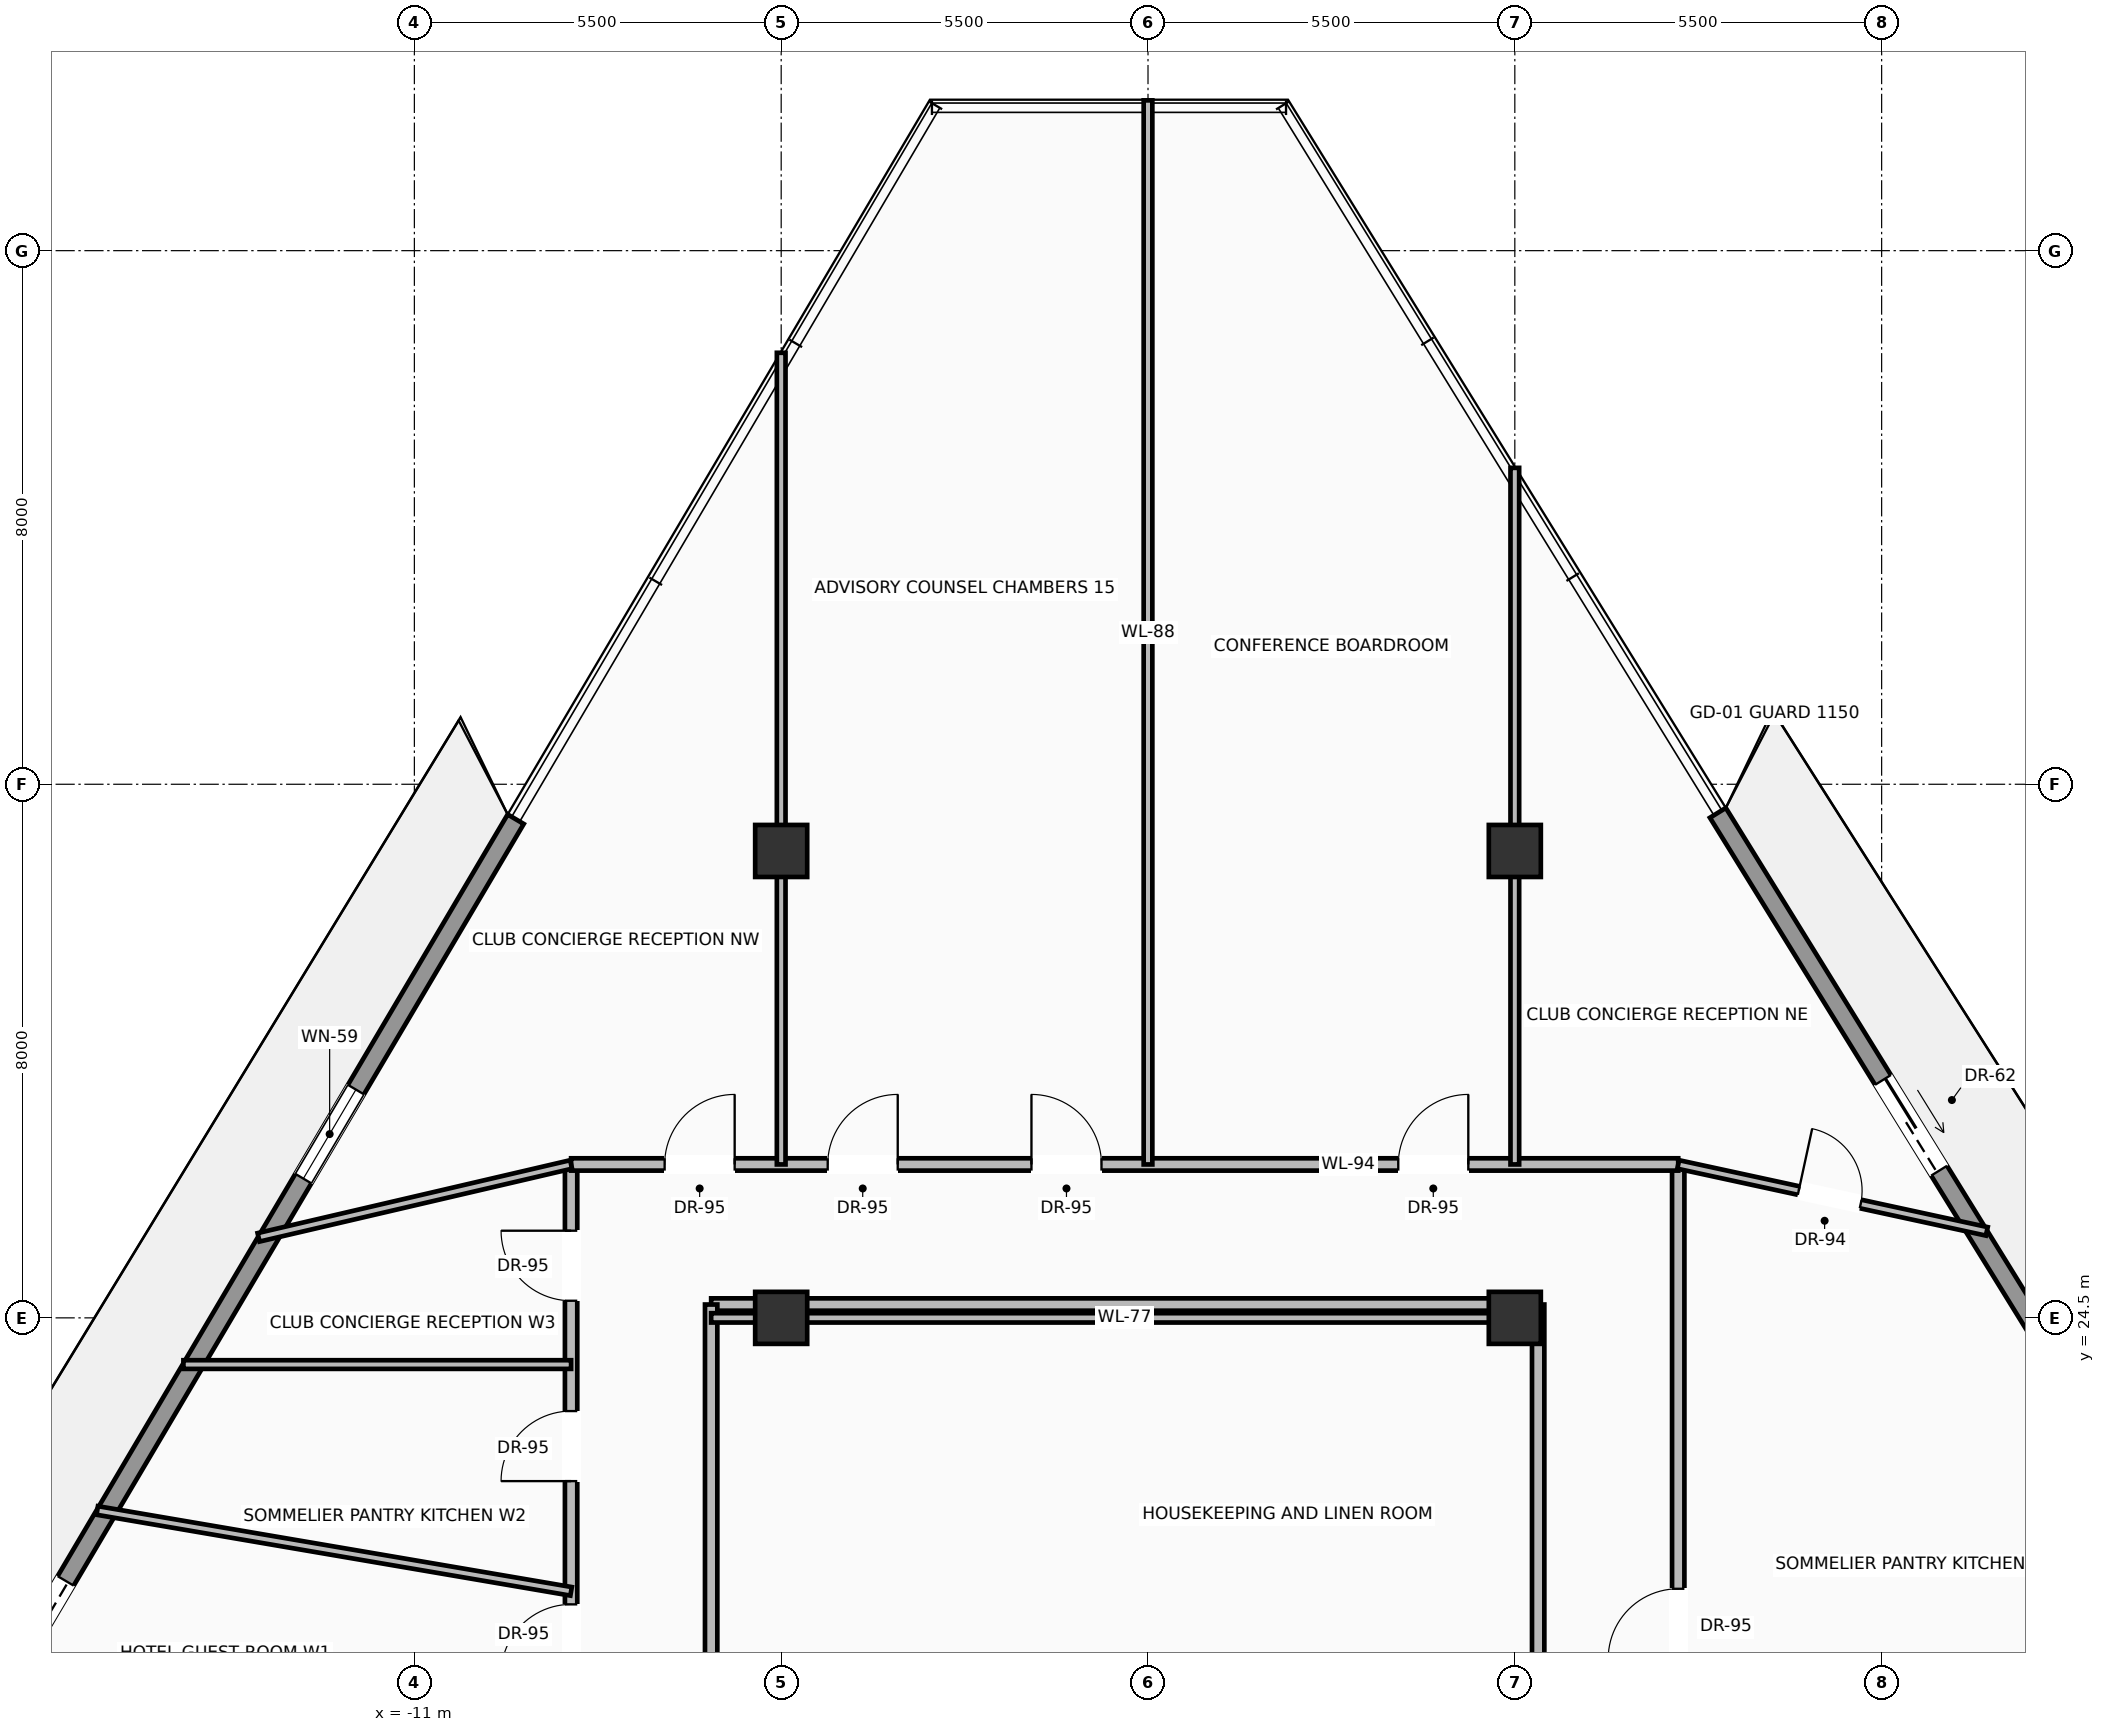
"""IFC4 building model, lengths in metres.
Left out: names, types, materials, properties, quantities, classifications, styles, units other than length and angle.
Written with IfcOpenShell. Run it as: python <this file> out.ifc"""

import sys

from ifc_helpers import new_model, si_unit, direction, frame, frame_2d, origin, origin_2d, place, context, subcontext, project, spatial, rectangle, extrude, source, transform, mapped, element, fill, save


model = new_model("IFC4")
c1 = context("Model", 3, precision=1e-05, world=origin(), true_north=direction((0.0, 1.0)))
c2 = subcontext(c1, "Body", "Model", "MODEL_VIEW")
j1 = project(units=[si_unit("LENGTHUNIT", "METRE"), si_unit("PLANEANGLEUNIT", "RADIAN")], contexts=[c1])
p1 = place(None, origin())
s1 = spatial("IfcSite", under=j1, at=p1, CompositionType="ELEMENT")
p2 = place(p1, origin())
s2 = spatial("IfcBuilding", under=s1, at=p2, CompositionType="ELEMENT")
p3 = place(p2, frame((0.0, 0.0, 237.25)))
s3 = spatial("IfcBuildingStorey", under=s2, at=p3, CompositionType="ELEMENT", Elevation=237.25)
m1 = source(origin(), c2, "Body", "SweptSolid", [
    extrude(rectangle(XDim=0.78, YDim=0.78, at=origin_2d()), origin(), (0.0, 0.0, 1.0), 3.45),
])
for number, where, z_axis, x_axis in (
    (1, (-5.5, 24.5, 0.0), (0.0, 0.0, 1.0), (1.0, 0.0, 0.0)),
    (2, (5.5, 24.5, 0.0), (0.0, 0.0, 1.0), (1.0, 0.0, 0.0)),
    (3, (-5.5, 31.5, 0.0), (0.0, 0.0, 1.0), (1.0, 0.0, 0.0)),
    (4, (5.5, 31.5, 0.0), (0.0, 0.0, 1.0), (1.0, 0.0, 0.0)),
):
    element("IfcColumn", number, at=place(p3, frame(where, z_axis=z_axis, x_axis=x_axis)), inside=s3, PredefinedType="COLUMN", context=c2, shape_type="MappedRepresentation", body=[
        mapped(m1, transform((0.0, 0.0, 0.0), scale=1.0)),
    ])
p4 = place(p3, frame((-19.43, 15.137, 0.0), z_axis=(0.0, 0.0, 1.0), x_axis=(0.508699873742, 0.860943922944, 0.0)))
e5 = element("IfcWall", 5, at=p4, inside=s3, PredefinedType="SOLIDWALL", context=c2, shape_type="SweptSolid", body=[
    extrude(rectangle(XDim=19.559, YDim=0.28, at=frame_2d((9.779, 0.0))), origin(), (0.0, 0.0, 1.0), 2.82),
])
p5 = place(p4, frame((4.694, 0.0, 0.0)))
e6 = element("IfcOpeningElement", 6, at=p5, cuts=e5, PredefinedType="OPENING", context=c2, shape_type="SweptSolid", body=[
    extrude(rectangle(XDim=1.6, YDim=2.35, at=frame_2d((0.8, 1.175))), frame((0.0, 0.15, 0.0), z_axis=(0.0, -1.0, 0.0), x_axis=(1.0, 0.0, 0.0)), (0.0, 0.0, 1.0), 0.3),
])
p6 = place(p4, frame((13.3, 0.0, 0.9)))
e7 = element("IfcOpeningElement", 7, at=p6, cuts=e5, PredefinedType="OPENING", context=c2, shape_type="SweptSolid", body=[
    extrude(rectangle(XDim=1.55, YDim=1.75, at=frame_2d((0.775, 0.875))), frame((0.0, 0.15, 0.0), z_axis=(0.0, -1.0, 0.0), x_axis=(1.0, 0.0, 0.0)), (0.0, 0.0, 1.0), 0.3),
])
p7 = place(p3, frame((8.545, 32.072, 0.0), z_axis=(0.0, 0.0, 1.0), x_axis=(0.52585107611, -0.850576654837, 0.0)))
e8 = element("IfcWall", 8, at=p7, inside=s3, PredefinedType="SOLIDWALL", context=c2, shape_type="SweptSolid", body=[
    extrude(rectangle(XDim=19.616, YDim=0.28, at=frame_2d((9.808, 0.0))), origin(), (0.0, 0.0, 1.0), 2.82),
])
p8 = place(p7, frame((4.708, 0.0, 0.0)))
e9 = element("IfcOpeningElement", 9, at=p8, cuts=e8, PredefinedType="OPENING", context=c2, shape_type="SweptSolid", body=[
    extrude(rectangle(XDim=1.6, YDim=2.35, at=frame_2d((0.8, 1.175))), frame((0.0, 0.15, 0.0), z_axis=(0.0, -1.0, 0.0), x_axis=(1.0, 0.0, 0.0)), (0.0, 0.0, 1.0), 0.3),
])
p9 = place(p7, frame((13.339, 0.0, 0.9)))
e10 = element("IfcOpeningElement", 10, at=p9, cuts=e8, PredefinedType="OPENING", context=c2, shape_type="SweptSolid", body=[
    extrude(rectangle(XDim=1.55, YDim=1.75, at=frame_2d((0.775, 0.875))), frame((0.0, 0.15, 0.0), z_axis=(0.0, -1.0, 0.0), x_axis=(1.0, 0.0, 0.0)), (0.0, 0.0, 1.0), 0.3),
])
p10 = place(p3, frame((-6.55, 24.7, 0.0), z_axis=(0.0, 0.0, 1.0), x_axis=(1.0, 0.0, 0.0)))
e11 = element("IfcWall", 11, at=p10, inside=s3, PredefinedType="PARTITIONING", context=c2, shape_type="SweptSolid", body=[
    extrude(rectangle(XDim=12.4, YDim=0.185, at=frame_2d((6.2, 0.0))), origin(), (0.0, 0.0, 1.0), 2.683),
])
for number, where, z_axis, x_axis in (
    (12, (-6.55, 18.4, 0.0), (0.0, 0.0, 1.0), (0.0, 1.0, 0.0)),
    (13, (5.85, 18.4, 0.0), (0.0, 0.0, 1.0), (0.0, 1.0, 0.0)),
):
    element("IfcWall", number, at=place(p3, frame(where, z_axis=z_axis, x_axis=x_axis)), inside=s3, PredefinedType="PARTITIONING", context=c2, shape_type="SweptSolid", body=[
        extrude(rectangle(XDim=6.3, YDim=0.185, at=frame_2d((3.15, 0.0))), origin(), (0.0, 0.0, 1.0), 3.232),
    ])
p11 = place(p3, frame((-8.65, 16.3, 0.0), z_axis=(0.0, 0.0, 1.0), x_axis=(0.0, 1.0, 0.0)))
e14 = element("IfcWall", 14, at=p11, inside=s3, PredefinedType="PARTITIONING", context=c2, shape_type="SweptSolid", body=[
    extrude(rectangle(XDim=10.5, YDim=0.185, at=frame_2d((5.25, 0.0))), origin(), (0.0, 0.0, 1.0), 3.232),
])
p12 = place(p11, frame((2.854, 0.0, 0.0)))
e15 = element("IfcOpeningElement", 15, at=p12, cuts=e14, PredefinedType="OPENING", context=c2, shape_type="SweptSolid", body=[
    extrude(rectangle(XDim=1.05, YDim=2.25, at=frame_2d((0.525, 1.125))), frame((0.0, 0.103, 0.0), z_axis=(0.0, -1.0, 0.0), x_axis=(1.0, 0.0, 0.0)), (0.0, 0.0, 1.0), 0.205),
])
p13 = place(p11, frame((5.752, 0.0, 0.0)))
e16 = element("IfcOpeningElement", 16, at=p13, cuts=e14, PredefinedType="OPENING", context=c2, shape_type="SweptSolid", body=[
    extrude(rectangle(XDim=1.05, YDim=2.25, at=frame_2d((0.525, 1.125))), frame((0.0, 0.103, 0.0), z_axis=(0.0, -1.0, 0.0), x_axis=(1.0, 0.0, 0.0)), (0.0, 0.0, 1.0), 0.205),
])
p14 = place(p11, frame((8.457, 0.0, 0.0)))
e17 = element("IfcOpeningElement", 17, at=p14, cuts=e14, PredefinedType="OPENING", context=c2, shape_type="SweptSolid", body=[
    extrude(rectangle(XDim=1.05, YDim=2.25, at=frame_2d((0.525, 1.125))), frame((0.0, 0.103, 0.0), z_axis=(0.0, -1.0, 0.0), x_axis=(1.0, 0.0, 0.0)), (0.0, 0.0, 1.0), 0.205),
])
p15 = place(p3, frame((7.95, 16.3, 0.0), z_axis=(0.0, 0.0, 1.0), x_axis=(0.0, 1.0, 0.0)))
e18 = element("IfcWall", 18, at=p15, inside=s3, PredefinedType="PARTITIONING", context=c2, shape_type="SweptSolid", body=[
    extrude(rectangle(XDim=10.5, YDim=0.185, at=frame_2d((5.25, 0.0))), origin(), (0.0, 0.0, 1.0), 3.232),
])
p16 = place(p15, frame((3.088, 0.0, 0.0)))
e19 = element("IfcOpeningElement", 19, at=p16, cuts=e18, PredefinedType="OPENING", context=c2, shape_type="SweptSolid", body=[
    extrude(rectangle(XDim=1.05, YDim=2.25, at=frame_2d((0.525, 1.125))), frame((0.0, 0.103, 0.0), z_axis=(0.0, -1.0, 0.0), x_axis=(1.0, 0.0, 0.0)), (0.0, 0.0, 1.0), 0.205),
])
p17 = place(p3, frame((-8.65, 26.8, 0.0), z_axis=(0.0, 0.0, 1.0), x_axis=(1.0, 0.0, 0.0)))
e20 = element("IfcWall", 20, at=p17, inside=s3, PredefinedType="PARTITIONING", context=c2, shape_type="SweptSolid", body=[
    extrude(rectangle(XDim=16.6, YDim=0.185, at=frame_2d((8.3, 0.0))), origin(), (0.0, 0.0, 1.0), 3.232),
])
p18 = place(p17, frame((3.847, 0.0, 0.0)))
e21 = element("IfcOpeningElement", 21, at=p18, cuts=e20, PredefinedType="OPENING", context=c2, shape_type="SweptSolid", body=[
    extrude(rectangle(XDim=1.05, YDim=2.25, at=frame_2d((0.525, 1.125))), frame((0.0, 0.103, 0.0), z_axis=(0.0, -1.0, 0.0), x_axis=(1.0, 0.0, 0.0)), (0.0, 0.0, 1.0), 0.205),
])
p19 = place(p17, frame((6.903, 0.0, 0.0)))
e22 = element("IfcOpeningElement", 22, at=p19, cuts=e20, PredefinedType="OPENING", context=c2, shape_type="SweptSolid", body=[
    extrude(rectangle(XDim=1.05, YDim=2.25, at=frame_2d((0.525, 1.125))), frame((0.0, 0.103, 0.0), z_axis=(0.0, -1.0, 0.0), x_axis=(1.0, 0.0, 0.0)), (0.0, 0.0, 1.0), 0.205),
])
p20 = place(p17, frame((12.403, 0.0, 0.0)))
e23 = element("IfcOpeningElement", 23, at=p20, cuts=e20, PredefinedType="OPENING", context=c2, shape_type="SweptSolid", body=[
    extrude(rectangle(XDim=1.05, YDim=2.25, at=frame_2d((0.525, 1.125))), frame((0.0, 0.103, 0.0), z_axis=(0.0, -1.0, 0.0), x_axis=(1.0, 0.0, 0.0)), (0.0, 0.0, 1.0), 0.205),
])
p21 = place(p17, frame((1.403, 0.0, 0.0)))
e24 = element("IfcOpeningElement", 24, at=p21, cuts=e20, PredefinedType="OPENING", context=c2, shape_type="SweptSolid", body=[
    extrude(rectangle(XDim=1.05, YDim=2.25, at=frame_2d((0.525, 1.125))), frame((0.0, 0.103, 0.0), z_axis=(0.0, -1.0, 0.0), x_axis=(1.0, 0.0, 0.0)), (0.0, 0.0, 1.0), 0.205),
])
p22 = place(p3, frame((-6.55, 24.5, 0.0), z_axis=(0.0, 0.0, 1.0), x_axis=(1.0, 0.0, 0.0)))
e25 = element("IfcWall", 25, at=p22, inside=s3, PredefinedType="PARTITIONING", context=c2, shape_type="SweptSolid", body=[
    extrude(rectangle(XDim=12.4, YDim=0.14, at=frame_2d((6.2, 0.0))), origin(), (0.0, 0.0, 1.0), 2.683),
])
p23 = place(p3, frame((-13.336, 25.707, 0.0), z_axis=(0.0, 0.0, 1.0), x_axis=(0.973859170727, 0.227152626203, 0.0)))
e26 = element("IfcWall", 26, at=p23, inside=s3, PredefinedType="PARTITIONING", context=c2, shape_type="SweptSolid", body=[
    extrude(rectangle(XDim=4.812, YDim=0.13, at=frame_2d((2.406, 0.0))), origin(), (0.0, 0.0, 1.0), 3.232),
])
p24 = place(p3, frame((7.95, 26.8, 0.0), z_axis=(0.0, 0.0, 1.0), x_axis=(0.977283281689, -0.211937224976, 0.0)))
e27 = element("IfcWall", 27, at=p24, inside=s3, PredefinedType="PARTITIONING", context=c2, shape_type="SweptSolid", body=[
    extrude(rectangle(XDim=4.735, YDim=0.13, at=frame_2d((2.367, 0.0))), origin(), (0.0, 0.0, 1.0), 3.232),
])
p25 = place(p24, frame((1.849, 0.0, 0.0)))
e28 = element("IfcOpeningElement", 28, at=p25, cuts=e27, PredefinedType="OPENING", context=c2, shape_type="SweptSolid", body=[
    extrude(rectangle(XDim=0.95, YDim=2.2, at=frame_2d((0.475, 1.1))), frame((0.0, 0.075, 0.0), z_axis=(0.0, -1.0, 0.0), x_axis=(1.0, 0.0, 0.0)), (0.0, 0.0, 1.0), 0.15),
])
p26 = place(p3, frame((-5.5, 26.8, 0.0), z_axis=(0.0, 0.0, 1.0), x_axis=(0.0, 1.0, 0.0)))
e29 = element("IfcWall", 29, at=p26, inside=s3, PredefinedType="PARTITIONING", context=c2, shape_type="SweptSolid", body=[
    extrude(rectangle(XDim=12.169, YDim=0.13, at=frame_2d((6.084, 0.0))), origin(), (0.0, 0.0, 1.0), 2.683),
])
p27 = place(p3, frame((5.5, 26.8, 0.0), z_axis=(0.0, 0.0, 1.0), x_axis=(0.0, 1.0, 0.0)))
e30 = element("IfcWall", 30, at=p27, inside=s3, PredefinedType="PARTITIONING", context=c2, shape_type="SweptSolid", body=[
    extrude(rectangle(XDim=10.444, YDim=0.13, at=frame_2d((5.222, 0.0))), origin(), (0.0, 0.0, 1.0), 2.683),
])
p28 = place(p3, frame((0.0, 26.8, 0.0), z_axis=(0.0, 0.0, 1.0), x_axis=(0.0, 1.0, 0.0)))
e31 = element("IfcWall", 31, at=p28, inside=s3, PredefinedType="PARTITIONING", context=c2, shape_type="SweptSolid", body=[
    extrude(rectangle(XDim=15.953, YDim=0.13, at=frame_2d((7.977, 0.0))), origin(), (0.0, 0.0, 1.0), 3.232),
])
p29 = place(p3, frame((-15.755, 21.613, 0.0), z_axis=(0.0, 0.0, 1.0), x_axis=(0.985747524056, -0.1682314442, 0.0)))
e32 = element("IfcWall", 32, at=p29, inside=s3, PredefinedType="PARTITIONING", context=c2, shape_type="SweptSolid", body=[
    extrude(rectangle(XDim=7.208, YDim=0.13, at=frame_2d((3.604, 0.0))), origin(), (0.0, 0.0, 1.0), 3.232),
])
p30 = place(p3, frame((-14.463, 23.8, 0.0), z_axis=(0.0, 0.0, 1.0), x_axis=(1.0, 0.0, 0.0)))
e33 = element("IfcWall", 33, at=p30, inside=s3, PredefinedType="PARTITIONING", context=c2, shape_type="SweptSolid", body=[
    extrude(rectangle(XDim=5.813, YDim=0.13, at=frame_2d((2.906, 0.0))), origin(), (0.0, 0.0, 1.0), 3.232),
])
m2 = source(origin(), c2, "Body", "SweptSolid", [
    extrude(rectangle(XDim=1.6, YDim=2.35, at=frame_2d((0.8, 1.175))), frame((0.0, 0.025, 0.0), z_axis=(0.0, -1.0, 0.0), x_axis=(1.0, 0.0, 0.0)), (0.0, 0.0, 1.0), 0.05),
])
p31 = place(p5, origin())
e34 = element("IfcDoor", 34, at=p31, inside=s3, OperationType="SLIDING_TO_LEFT", PredefinedType="DOOR", context=c2, shape_type="MappedRepresentation", body=[
    mapped(m2, transform((0.0, 0.0, 0.0), scale=1.0)),
])
fill(e6, e34)
m3 = source(origin(), c2, "Body", "SweptSolid", [
    extrude(rectangle(XDim=1.55, YDim=1.75, at=frame_2d((0.775, 0.875))), frame((0.0, 0.03, 0.0), z_axis=(0.0, -1.0, 0.0), x_axis=(1.0, 0.0, 0.0)), (0.0, 0.0, 1.0), 0.06),
])
p32 = place(p6, origin())
e35 = element("IfcWindow", 35, at=p32, inside=s3, PartitioningType="SINGLE_PANEL", PredefinedType="WINDOW", context=c2, shape_type="MappedRepresentation", body=[
    mapped(m3, transform((0.0, 0.0, 0.0), scale=1.0)),
])
fill(e7, e35)
p33 = place(p8, origin())
e36 = element("IfcDoor", 36, at=p33, inside=s3, OperationType="SLIDING_TO_RIGHT", PredefinedType="DOOR", context=c2, shape_type="MappedRepresentation", body=[
    mapped(m2, transform((0.0, 0.0, 0.0), scale=1.0)),
])
fill(e9, e36)
m4 = source(origin(), c2, "Body", "SweptSolid", [
    extrude(rectangle(XDim=1.05, YDim=2.25, at=frame_2d((0.525, 1.125))), frame((0.0, 0.025, 0.0), z_axis=(0.0, -1.0, 0.0), x_axis=(1.0, 0.0, 0.0)), (0.0, 0.0, 1.0), 0.05),
])
p34 = place(p12, origin())
e37 = element("IfcDoor", 37, at=p34, inside=s3, OperationType="SINGLE_SWING_LEFT", PredefinedType="DOOR", context=c2, shape_type="MappedRepresentation", body=[
    mapped(m4, transform((0.0, 0.0, 0.0), scale=1.0)),
])
fill(e15, e37)
p35 = place(p13, origin())
e38 = element("IfcDoor", 38, at=p35, inside=s3, OperationType="SINGLE_SWING_LEFT", PredefinedType="DOOR", context=c2, shape_type="MappedRepresentation", body=[
    mapped(m4, transform((0.0, 0.0, 0.0), scale=1.0)),
])
fill(e16, e38)
p36 = place(p14, origin())
e39 = element("IfcDoor", 39, at=p36, inside=s3, OperationType="SINGLE_SWING_RIGHT", PredefinedType="DOOR", context=c2, shape_type="MappedRepresentation", body=[
    mapped(m4, transform((0.0, 0.0, 0.0), scale=1.0)),
])
fill(e17, e39)
p37 = place(p16, origin())
e40 = element("IfcDoor", 40, at=p37, inside=s3, OperationType="SINGLE_SWING_LEFT", PredefinedType="DOOR", context=c2, shape_type="MappedRepresentation", body=[
    mapped(m4, transform((0.0, 0.0, 0.0), scale=1.0)),
])
fill(e19, e40)
p38 = place(p18, origin())
e41 = element("IfcDoor", 41, at=p38, inside=s3, OperationType="SINGLE_SWING_RIGHT", PredefinedType="DOOR", context=c2, shape_type="MappedRepresentation", body=[
    mapped(m4, transform((0.0, 0.0, 0.0), scale=1.0)),
])
fill(e21, e41)
p39 = place(p19, origin())
e42 = element("IfcDoor", 42, at=p39, inside=s3, OperationType="SINGLE_SWING_LEFT", PredefinedType="DOOR", context=c2, shape_type="MappedRepresentation", body=[
    mapped(m4, transform((0.0, 0.0, 0.0), scale=1.0)),
])
fill(e22, e42)
p40 = place(p20, origin())
e43 = element("IfcDoor", 43, at=p40, inside=s3, OperationType="SINGLE_SWING_RIGHT", PredefinedType="DOOR", context=c2, shape_type="MappedRepresentation", body=[
    mapped(m4, transform((0.0, 0.0, 0.0), scale=1.0)),
])
fill(e23, e43)
m5 = source(origin(), c2, "Body", "SweptSolid", [
    extrude(rectangle(XDim=0.95, YDim=2.2, at=frame_2d((0.475, 1.1))), frame((0.0, 0.025, 0.0), z_axis=(0.0, -1.0, 0.0), x_axis=(1.0, 0.0, 0.0)), (0.0, 0.0, 1.0), 0.05),
])
p41 = place(p25, origin())
e44 = element("IfcDoor", 44, at=p41, inside=s3, OperationType="SINGLE_SWING_LEFT", PredefinedType="DOOR", context=c2, shape_type="MappedRepresentation", body=[
    mapped(m5, transform((0.0, 0.0, 0.0), scale=1.0)),
])
fill(e28, e44)
p42 = place(p21, origin())
e45 = element("IfcDoor", 45, at=p42, inside=s3, OperationType="SINGLE_SWING_RIGHT", PredefinedType="DOOR", context=c2, shape_type="MappedRepresentation", body=[
    mapped(m4, transform((0.0, 0.0, 0.0), scale=1.0)),
])
fill(e24, e45)
save(model, sys.argv[1])
